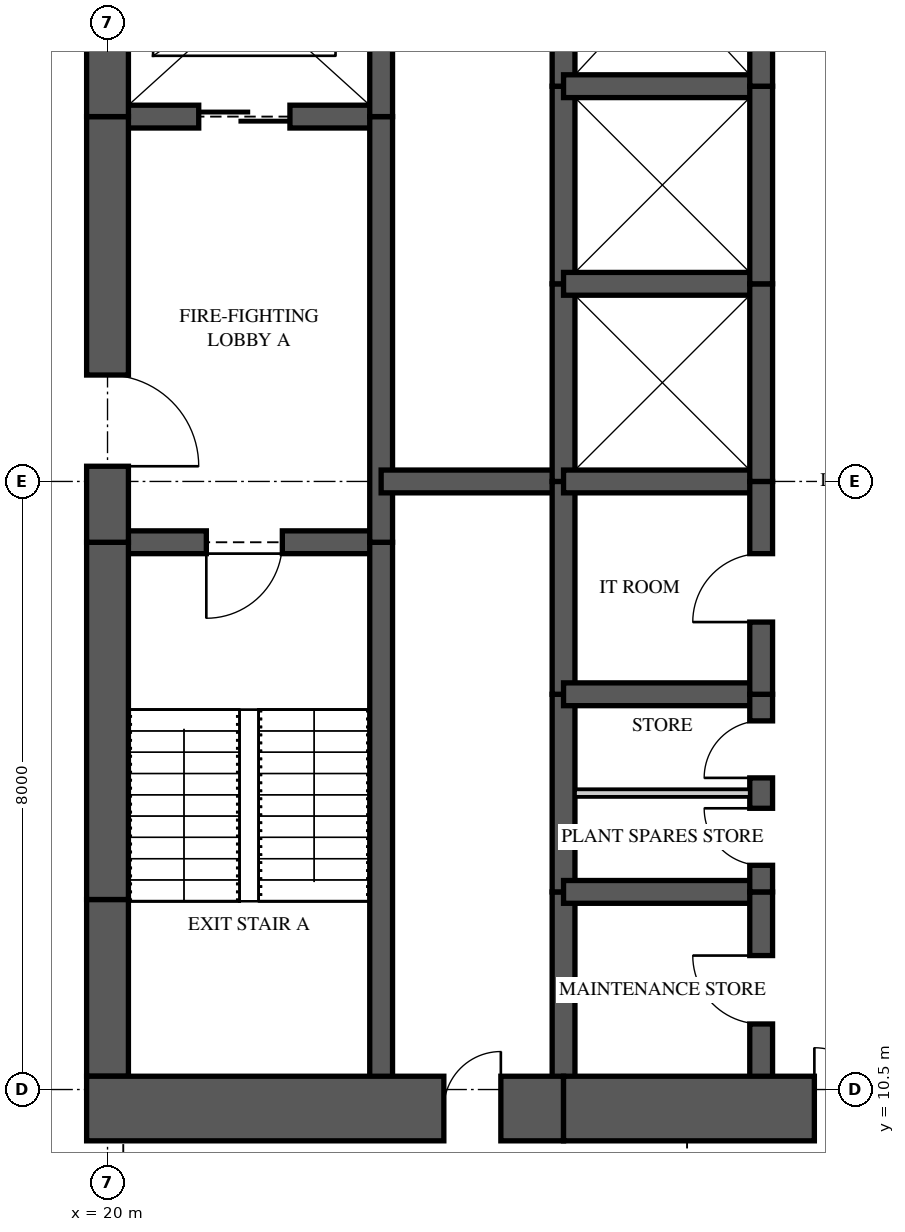
"""IFC4 building model, lengths in metres.
Left out: names, types, materials, properties, quantities, classifications, styles, units other than length and angle.
Written with IfcOpenShell. Run it as: python <this file> out.ifc"""

import sys

from ifc_helpers import new_model, si_unit, direction, frame, frame_2d, origin, place, context, subcontext, project, spatial, rectangle, extrude, element, fill, save


model = new_model("IFC4")
c1 = context("Model", 3, precision=1e-05, world=origin(), true_north=direction((0.0, 1.0)))
c2 = subcontext(c1, "Body", "Model", "MODEL_VIEW")
j1 = project(units=[si_unit("LENGTHUNIT", "METRE"), si_unit("PLANEANGLEUNIT", "RADIAN")], contexts=[c1])
p1 = place(None, origin())
s1 = spatial("IfcSite", under=j1, at=p1, CompositionType="ELEMENT")
p2 = place(p1, origin())
s2 = spatial("IfcBuilding", under=s1, at=p2, CompositionType="ELEMENT")
p3 = place(p2, frame((0.0, 0.0, 267.75)))
s3 = spatial("IfcBuildingStorey", under=s2, at=p3, CompositionType="ELEMENT", Elevation=267.75)
p4 = place(p3, frame((19.725, 10.25, 0.0), z_axis=(0.0, 0.0, 1.0), x_axis=(1.0, 0.0, 0.0)))
e1 = element("IfcWall", 1, at=p4, inside=s3, PredefinedType="SHEAR", context=c2, shape_type="SweptSolid", body=[
    extrude(rectangle(XDim=6.275, YDim=0.85, at=frame_2d((3.137, 0.0))), origin(), (0.0, 0.0, 1.0), 5.0),
])
p5 = place(p4, frame((4.7, 0.0, 0.0)))
e2 = element("IfcOpeningElement", 2, at=p5, cuts=e1, PredefinedType="OPENING", context=c2, shape_type="SweptSolid", body=[
    extrude(rectangle(XDim=0.75, YDim=2.1, at=frame_2d((0.375, 1.05))), frame((0.0, 0.435, 0.0), z_axis=(0.0, -1.0, 0.0), x_axis=(1.0, 0.0, 0.0)), (0.0, 0.0, 1.0), 0.87),
])
p6 = place(p3, frame((26.0, 10.25, 0.0), z_axis=(0.0, 0.0, 1.0), x_axis=(1.0, 0.0, 0.0)))
e3 = element("IfcWall", 3, at=p6, inside=s3, PredefinedType="SHEAR", context=c2, shape_type="SweptSolid", body=[
    extrude(rectangle(XDim=5.6, YDim=0.85, at=frame_2d((2.8, 0.0))), origin(), (0.0, 0.0, 1.0), 5.0),
])
p7 = place(p6, frame((3.3, 0.0, 0.0)))
e4 = element("IfcOpeningElement", 4, at=p7, cuts=e3, PredefinedType="OPENING", context=c2, shape_type="SweptSolid", body=[
    extrude(rectangle(XDim=1.6, YDim=2.1, at=frame_2d((0.8, 1.05))), frame((0.0, 0.435, 0.0), z_axis=(0.0, -1.0, 0.0), x_axis=(1.0, 0.0, 0.0)), (0.0, 0.0, 1.0), 0.87),
])
p8 = place(p3, frame((20.0, 26.325, 0.0), z_axis=(0.0, 0.0, 1.0), x_axis=(0.0, -1.0, 0.0)))
e5 = element("IfcWall", 5, at=p8, inside=s3, PredefinedType="SHEAR", context=c2, shape_type="SweptSolid", body=[
    extrude(rectangle(XDim=3.025, YDim=0.55, at=frame_2d((1.512, 0.0))), origin(), (0.0, 0.0, 1.0), 5.0),
])
p9 = place(p3, frame((20.0, 23.3, 0.0), z_axis=(0.0, 0.0, 1.0), x_axis=(0.0, -1.0, 0.0)))
e6 = element("IfcWall", 6, at=p9, inside=s3, PredefinedType="SHEAR", context=c2, shape_type="SweptSolid", body=[
    extrude(rectangle(XDim=5.6, YDim=0.55, at=frame_2d((2.8, 0.0))), origin(), (0.0, 0.0, 1.0), 5.0),
])
p10 = place(p9, frame((3.4, 0.0, 0.0)))
e7 = element("IfcOpeningElement", 7, at=p10, cuts=e6, PredefinedType="OPENING", context=c2, shape_type="SweptSolid", body=[
    extrude(rectangle(XDim=1.2, YDim=2.2, at=frame_2d((0.6, 1.1))), frame((0.0, 0.285, 0.0), z_axis=(0.0, -1.0, 0.0), x_axis=(1.0, 0.0, 0.0)), (0.0, 0.0, 1.0), 0.57),
])
p11 = place(p3, frame((20.0, 17.7, 0.0), z_axis=(0.0, 0.0, 1.0), x_axis=(0.0, -1.0, 0.0)))
e8 = element("IfcWall", 8, at=p11, inside=s3, PredefinedType="SHEAR", context=c2, shape_type="SweptSolid", body=[
    extrude(rectangle(XDim=4.7, YDim=0.55, at=frame_2d((2.35, 0.0))), origin(), (0.0, 0.0, 1.0), 5.0),
])
p12 = place(p3, frame((20.0, 13.0, 0.0), z_axis=(0.0, 0.0, 1.0), x_axis=(0.0, -1.0, 0.0)))
e9 = element("IfcWall", 9, at=p12, inside=s3, PredefinedType="SHEAR", context=c2, shape_type="SweptSolid", body=[
    extrude(rectangle(XDim=2.325, YDim=0.55, at=frame_2d((1.163, 0.0))), origin(), (0.0, 0.0, 1.0), 5.0),
])
p13 = place(p3, frame((23.6, 10.25, 0.0), z_axis=(0.0, 0.0, 1.0), x_axis=(0.0, 1.0, 0.0)))
e10 = element("IfcWall", 10, at=p13, inside=s3, PredefinedType="SHEAR", context=c2, shape_type="SweptSolid", body=[
    extrude(rectangle(XDim=7.45, YDim=0.3, at=frame_2d((3.725, 0.0))), origin(), (0.0, 0.0, 1.0), 5.0),
])
p14 = place(p3, frame((23.6, 17.7, 0.0), z_axis=(0.0, 0.0, 1.0), x_axis=(0.0, 1.0, 0.0)))
e11 = element("IfcWall", 11, at=p14, inside=s3, PredefinedType="SHEAR", context=c2, shape_type="SweptSolid", body=[
    extrude(rectangle(XDim=5.6, YDim=0.3, at=frame_2d((2.8, 0.0))), origin(), (0.0, 0.0, 1.0), 5.0),
])
p15 = place(p3, frame((23.6, 23.3, 0.0), z_axis=(0.0, 0.0, 1.0), x_axis=(0.0, 1.0, 0.0)))
e12 = element("IfcWall", 12, at=p15, inside=s3, PredefinedType="SHEAR", context=c2, shape_type="SweptSolid", body=[
    extrude(rectangle(XDim=3.45, YDim=0.3, at=frame_2d((1.725, 0.0))), origin(), (0.0, 0.0, 1.0), 5.0),
])
p16 = place(p3, frame((26.0, 10.25, 0.0), z_axis=(0.0, 0.0, 1.0), x_axis=(0.0, 1.0, 0.0)))
e13 = element("IfcWall", 13, at=p16, inside=s3, PredefinedType="SHEAR", context=c2, shape_type="SweptSolid", body=[
    extrude(rectangle(XDim=2.85, YDim=0.3, at=frame_2d((1.425, 0.0))), origin(), (0.0, 0.0, 1.0), 5.0),
])
p17 = place(p3, frame((26.0, 13.1, 0.0), z_axis=(0.0, 0.0, 1.0), x_axis=(0.0, 1.0, 0.0)))
e14 = element("IfcWall", 14, at=p17, inside=s3, PredefinedType="SHEAR", context=c2, shape_type="SweptSolid", body=[
    extrude(rectangle(XDim=2.6, YDim=0.3, at=frame_2d((1.3, 0.0))), origin(), (0.0, 0.0, 1.0), 5.0),
])
p18 = place(p3, frame((26.0, 15.7, 0.0), z_axis=(0.0, 0.0, 1.0), x_axis=(0.0, 1.0, 0.0)))
e15 = element("IfcWall", 15, at=p18, inside=s3, PredefinedType="SHEAR", context=c2, shape_type="SweptSolid", body=[
    extrude(rectangle(XDim=2.8, YDim=0.3, at=frame_2d((1.4, 0.0))), origin(), (0.0, 0.0, 1.0), 5.0),
])
p19 = place(p3, frame((26.0, 18.5, 0.0), z_axis=(0.0, 0.0, 1.0), x_axis=(0.0, 1.0, 0.0)))
e16 = element("IfcWall", 16, at=p19, inside=s3, PredefinedType="SHEAR", context=c2, shape_type="SweptSolid", body=[
    extrude(rectangle(XDim=2.6, YDim=0.3, at=frame_2d((1.3, 0.0))), origin(), (0.0, 0.0, 1.0), 5.0),
])
p20 = place(p3, frame((26.0, 21.1, 0.0), z_axis=(0.0, 0.0, 1.0), x_axis=(0.0, 1.0, 0.0)))
e17 = element("IfcWall", 17, at=p20, inside=s3, PredefinedType="SHEAR", context=c2, shape_type="SweptSolid", body=[
    extrude(rectangle(XDim=2.6, YDim=0.3, at=frame_2d((1.3, 0.0))), origin(), (0.0, 0.0, 1.0), 5.0),
])
p21 = place(p3, frame((26.0, 23.7, 0.0), z_axis=(0.0, 0.0, 1.0), x_axis=(0.0, 1.0, 0.0)))
e18 = element("IfcWall", 18, at=p21, inside=s3, PredefinedType="SHEAR", context=c2, shape_type="SweptSolid", body=[
    extrude(rectangle(XDim=3.05, YDim=0.3, at=frame_2d((1.525, 0.0))), origin(), (0.0, 0.0, 1.0), 5.0),
])
p22 = place(p3, frame((28.6, 10.25, 0.0), z_axis=(0.0, 0.0, 1.0), x_axis=(0.0, 1.0, 0.0)))
e19 = element("IfcWall", 19, at=p22, inside=s3, PredefinedType="SHEAR", context=c2, shape_type="SweptSolid", body=[
    extrude(rectangle(XDim=2.85, YDim=0.3, at=frame_2d((1.425, 0.0))), origin(), (0.0, 0.0, 1.0), 5.0),
])
p23 = place(p22, frame((1.113, 0.0, 0.0)))
e20 = element("IfcOpeningElement", 20, at=p23, cuts=e19, PredefinedType="OPENING", context=c2, shape_type="SweptSolid", body=[
    extrude(rectangle(XDim=0.9, YDim=2.1, at=frame_2d((0.45, 1.05))), frame((0.0, 0.16, 0.0), z_axis=(0.0, -1.0, 0.0), x_axis=(1.0, 0.0, 0.0)), (0.0, 0.0, 1.0), 0.32),
])
p24 = place(p3, frame((28.6, 13.1, 0.0), z_axis=(0.0, 0.0, 1.0), x_axis=(0.0, 1.0, 0.0)))
e21 = element("IfcWall", 21, at=p24, inside=s3, PredefinedType="SHEAR", context=c2, shape_type="SweptSolid", body=[
    extrude(rectangle(XDim=2.6, YDim=0.3, at=frame_2d((1.3, 0.0))), origin(), (0.0, 0.0, 1.0), 5.0),
])
p25 = place(p24, frame((0.35, 0.0, 0.0)))
e22 = element("IfcOpeningElement", 22, at=p25, cuts=e21, PredefinedType="OPENING", context=c2, shape_type="SweptSolid", body=[
    extrude(rectangle(XDim=0.75, YDim=2.1, at=frame_2d((0.375, 1.05))), frame((0.0, 0.16, 0.0), z_axis=(0.0, -1.0, 0.0), x_axis=(1.0, 0.0, 0.0)), (0.0, 0.0, 1.0), 0.32),
])
p26 = place(p24, frame((1.5, 0.0, 0.0)))
e23 = element("IfcOpeningElement", 23, at=p26, cuts=e21, PredefinedType="OPENING", context=c2, shape_type="SweptSolid", body=[
    extrude(rectangle(XDim=0.75, YDim=2.1, at=frame_2d((0.375, 1.05))), frame((0.0, 0.16, 0.0), z_axis=(0.0, -1.0, 0.0), x_axis=(1.0, 0.0, 0.0)), (0.0, 0.0, 1.0), 0.32),
])
p27 = place(p3, frame((28.6, 15.7, 0.0), z_axis=(0.0, 0.0, 1.0), x_axis=(0.0, 1.0, 0.0)))
e24 = element("IfcWall", 24, at=p27, inside=s3, PredefinedType="SHEAR", context=c2, shape_type="SweptSolid", body=[
    extrude(rectangle(XDim=2.8, YDim=0.3, at=frame_2d((1.4, 0.0))), origin(), (0.0, 0.0, 1.0), 5.0),
])
p28 = place(p27, frame((0.95, 0.0, 0.0)))
e25 = element("IfcOpeningElement", 25, at=p28, cuts=e24, PredefinedType="OPENING", context=c2, shape_type="SweptSolid", body=[
    extrude(rectangle(XDim=0.9, YDim=2.1, at=frame_2d((0.45, 1.05))), frame((0.0, 0.16, 0.0), z_axis=(0.0, -1.0, 0.0), x_axis=(1.0, 0.0, 0.0)), (0.0, 0.0, 1.0), 0.32),
])
p29 = place(p3, frame((28.6, 18.5, 0.0), z_axis=(0.0, 0.0, 1.0), x_axis=(0.0, 1.0, 0.0)))
e26 = element("IfcWall", 26, at=p29, inside=s3, PredefinedType="SHEAR", context=c2, shape_type="SweptSolid", body=[
    extrude(rectangle(XDim=2.6, YDim=0.3, at=frame_2d((1.3, 0.0))), origin(), (0.0, 0.0, 1.0), 5.0),
])
p30 = place(p3, frame((28.6, 21.1, 0.0), z_axis=(0.0, 0.0, 1.0), x_axis=(0.0, 1.0, 0.0)))
e27 = element("IfcWall", 27, at=p30, inside=s3, PredefinedType="SHEAR", context=c2, shape_type="SweptSolid", body=[
    extrude(rectangle(XDim=2.6, YDim=0.3, at=frame_2d((1.3, 0.0))), origin(), (0.0, 0.0, 1.0), 5.0),
])
p31 = place(p3, frame((28.6, 23.7, 0.0), z_axis=(0.0, 0.0, 1.0), x_axis=(0.0, 1.0, 0.0)))
e28 = element("IfcWall", 28, at=p31, inside=s3, PredefinedType="SHEAR", context=c2, shape_type="SweptSolid", body=[
    extrude(rectangle(XDim=3.05, YDim=0.3, at=frame_2d((1.525, 0.0))), origin(), (0.0, 0.0, 1.0), 5.0),
])
p32 = place(p3, frame((20.0, 17.7, 0.0), z_axis=(0.0, 0.0, 1.0), x_axis=(1.0, 0.0, 0.0)))
e29 = element("IfcWall", 29, at=p32, inside=s3, PredefinedType="SHEAR", context=c2, shape_type="SweptSolid", body=[
    extrude(rectangle(XDim=3.6, YDim=0.3, at=frame_2d((1.8, 0.0))), origin(), (0.0, 0.0, 1.0), 5.0),
])
p33 = place(p32, frame((1.3, 0.0, 0.0)))
e30 = element("IfcOpeningElement", 30, at=p33, cuts=e29, PredefinedType="OPENING", context=c2, shape_type="SweptSolid", body=[
    extrude(rectangle(XDim=1.0, YDim=2.1, at=frame_2d((0.5, 1.05))), frame((0.0, 0.16, 0.0), z_axis=(0.0, -1.0, 0.0), x_axis=(1.0, 0.0, 0.0)), (0.0, 0.0, 1.0), 0.32),
])
p34 = place(p3, frame((20.0, 23.3, 0.0), z_axis=(0.0, 0.0, 1.0), x_axis=(1.0, 0.0, 0.0)))
e31 = element("IfcWall", 31, at=p34, inside=s3, PredefinedType="SHEAR", context=c2, shape_type="SweptSolid", body=[
    extrude(rectangle(XDim=3.6, YDim=0.3, at=frame_2d((1.8, 0.0))), origin(), (0.0, 0.0, 1.0), 5.0),
])
p35 = place(p34, frame((1.2, 0.0, 0.0)))
e32 = element("IfcOpeningElement", 32, at=p35, cuts=e31, PredefinedType="OPENING", context=c2, shape_type="SweptSolid", body=[
    extrude(rectangle(XDim=1.2, YDim=2.1, at=frame_2d((0.6, 1.05))), frame((0.0, 0.16, 0.0), z_axis=(0.0, -1.0, 0.0), x_axis=(1.0, 0.0, 0.0)), (0.0, 0.0, 1.0), 0.32),
])
p36 = place(p3, frame((23.6, 18.5, 0.0), z_axis=(0.0, 0.0, 1.0), x_axis=(1.0, 0.0, 0.0)))
e33 = element("IfcWall", 33, at=p36, inside=s3, PredefinedType="SHEAR", context=c2, shape_type="SweptSolid", body=[
    extrude(rectangle(XDim=2.4, YDim=0.3, at=frame_2d((1.2, 0.0))), origin(), (0.0, 0.0, 1.0), 5.0),
])
for number, where, z_axis, x_axis in (
    (34, (26.0, 13.1, 0.0), (0.0, 0.0, 1.0), (1.0, 0.0, 0.0)),
    (35, (26.0, 15.7, 0.0), (0.0, 0.0, 1.0), (1.0, 0.0, 0.0)),
    (36, (26.0, 18.5, 0.0), (0.0, 0.0, 1.0), (1.0, 0.0, 0.0)),
    (37, (26.0, 21.1, 0.0), (0.0, 0.0, 1.0), (1.0, 0.0, 0.0)),
    (38, (26.0, 23.7, 0.0), (0.0, 0.0, 1.0), (1.0, 0.0, 0.0)),
):
    element("IfcWall", number, at=place(p3, frame(where, z_axis=z_axis, x_axis=x_axis)), inside=s3, PredefinedType="SHEAR", context=c2, shape_type="SweptSolid", body=[
        extrude(rectangle(XDim=2.6, YDim=0.3, at=frame_2d((1.3, 0.0))), origin(), (0.0, 0.0, 1.0), 5.0),
    ])
p37 = place(p3, frame((26.15, 14.4, 0.0), z_axis=(0.0, 0.0, 1.0), x_axis=(1.0, 0.0, 0.0)))
e39 = element("IfcWall", 39, at=p37, inside=s3, PredefinedType="PARTITIONING", context=c2, shape_type="SweptSolid", body=[
    extrude(rectangle(XDim=2.3, YDim=0.1, at=frame_2d((1.15, 0.0))), origin(), (0.0, 0.0, 1.0), 4.72),
])
p38 = place(p33, frame((1.0, 0.0, 0.0), z_axis=(0.0, 0.0, 1.0), x_axis=(-1.0, 0.0, 0.0)))
e40 = element("IfcDoor", 40, at=p38, inside=s3, OperationType="SINGLE_SWING_RIGHT", PredefinedType="DOOR", context=c2, shape_type="SweptSolid", body=[
    extrude(rectangle(XDim=1.0, YDim=2.1, at=frame_2d((0.5, 1.05))), frame((0.0, 0.025, 0.0), z_axis=(0.0, -1.0, 0.0), x_axis=(1.0, 0.0, 0.0)), (0.0, 0.0, 1.0), 0.05),
])
fill(e30, e40)
p39 = place(p10, origin())
e41 = element("IfcDoor", 41, at=p39, inside=s3, OperationType="SINGLE_SWING_RIGHT", PredefinedType="DOOR", context=c2, shape_type="SweptSolid", body=[
    extrude(rectangle(XDim=1.2, YDim=2.2, at=frame_2d((0.6, 1.1))), frame((0.0, 0.025, 0.0), z_axis=(0.0, -1.0, 0.0), x_axis=(1.0, 0.0, 0.0)), (0.0, 0.0, 1.0), 0.05),
])
fill(e7, e41)
p40 = place(p35, origin())
e42 = element("IfcDoor", 42, at=p40, inside=s3, OperationType="SLIDING_TO_LEFT", PredefinedType="DOOR", context=c2, shape_type="SweptSolid", body=[
    extrude(rectangle(XDim=1.2, YDim=2.1, at=frame_2d((0.6, 1.05))), frame((0.0, 0.025, 0.0), z_axis=(0.0, -1.0, 0.0), x_axis=(1.0, 0.0, 0.0)), (0.0, 0.0, 1.0), 0.05),
])
fill(e32, e42)
p41 = place(p23, origin())
e43 = element("IfcDoor", 43, at=p41, inside=s3, OperationType="SINGLE_SWING_RIGHT", PredefinedType="DOOR", context=c2, shape_type="SweptSolid", body=[
    extrude(rectangle(XDim=0.9, YDim=2.1, at=frame_2d((0.45, 1.05))), frame((0.0, 0.025, 0.0), z_axis=(0.0, -1.0, 0.0), x_axis=(1.0, 0.0, 0.0)), (0.0, 0.0, 1.0), 0.05),
])
fill(e20, e43)
p42 = place(p25, origin())
e44 = element("IfcDoor", 44, at=p42, inside=s3, OperationType="SINGLE_SWING_RIGHT", PredefinedType="DOOR", context=c2, shape_type="SweptSolid", body=[
    extrude(rectangle(XDim=0.75, YDim=2.1, at=frame_2d((0.375, 1.05))), frame((0.0, 0.025, 0.0), z_axis=(0.0, -1.0, 0.0), x_axis=(1.0, 0.0, 0.0)), (0.0, 0.0, 1.0), 0.05),
])
fill(e22, e44)
p43 = place(p26, origin())
e45 = element("IfcDoor", 45, at=p43, inside=s3, OperationType="SINGLE_SWING_LEFT", PredefinedType="DOOR", context=c2, shape_type="SweptSolid", body=[
    extrude(rectangle(XDim=0.75, YDim=2.1, at=frame_2d((0.375, 1.05))), frame((0.0, 0.025, 0.0), z_axis=(0.0, -1.0, 0.0), x_axis=(1.0, 0.0, 0.0)), (0.0, 0.0, 1.0), 0.05),
])
fill(e23, e45)
p44 = place(p28, origin())
e46 = element("IfcDoor", 46, at=p44, inside=s3, OperationType="SINGLE_SWING_LEFT", PredefinedType="DOOR", context=c2, shape_type="SweptSolid", body=[
    extrude(rectangle(XDim=0.9, YDim=2.1, at=frame_2d((0.45, 1.05))), frame((0.0, 0.025, 0.0), z_axis=(0.0, -1.0, 0.0), x_axis=(1.0, 0.0, 0.0)), (0.0, 0.0, 1.0), 0.05),
])
fill(e25, e46)
p45 = place(p7, origin())
e47 = element("IfcDoor", 47, at=p45, inside=s3, OperationType="DOUBLE_DOOR_SINGLE_SWING", PredefinedType="DOOR", context=c2, shape_type="SweptSolid", body=[
    extrude(rectangle(XDim=1.6, YDim=2.1, at=frame_2d((0.8, 1.05))), frame((0.0, 0.025, 0.0), z_axis=(0.0, -1.0, 0.0), x_axis=(1.0, 0.0, 0.0)), (0.0, 0.0, 1.0), 0.05),
])
fill(e4, e47)
p46 = place(p5, origin())
e48 = element("IfcDoor", 48, at=p46, inside=s3, OperationType="SINGLE_SWING_RIGHT", PredefinedType="DOOR", context=c2, shape_type="SweptSolid", body=[
    extrude(rectangle(XDim=0.75, YDim=2.1, at=frame_2d((0.375, 1.05))), frame((0.0, 0.025, 0.0), z_axis=(0.0, -1.0, 0.0), x_axis=(1.0, 0.0, 0.0)), (0.0, 0.0, 1.0), 0.05),
])
fill(e2, e48)
save(model, sys.argv[1])
